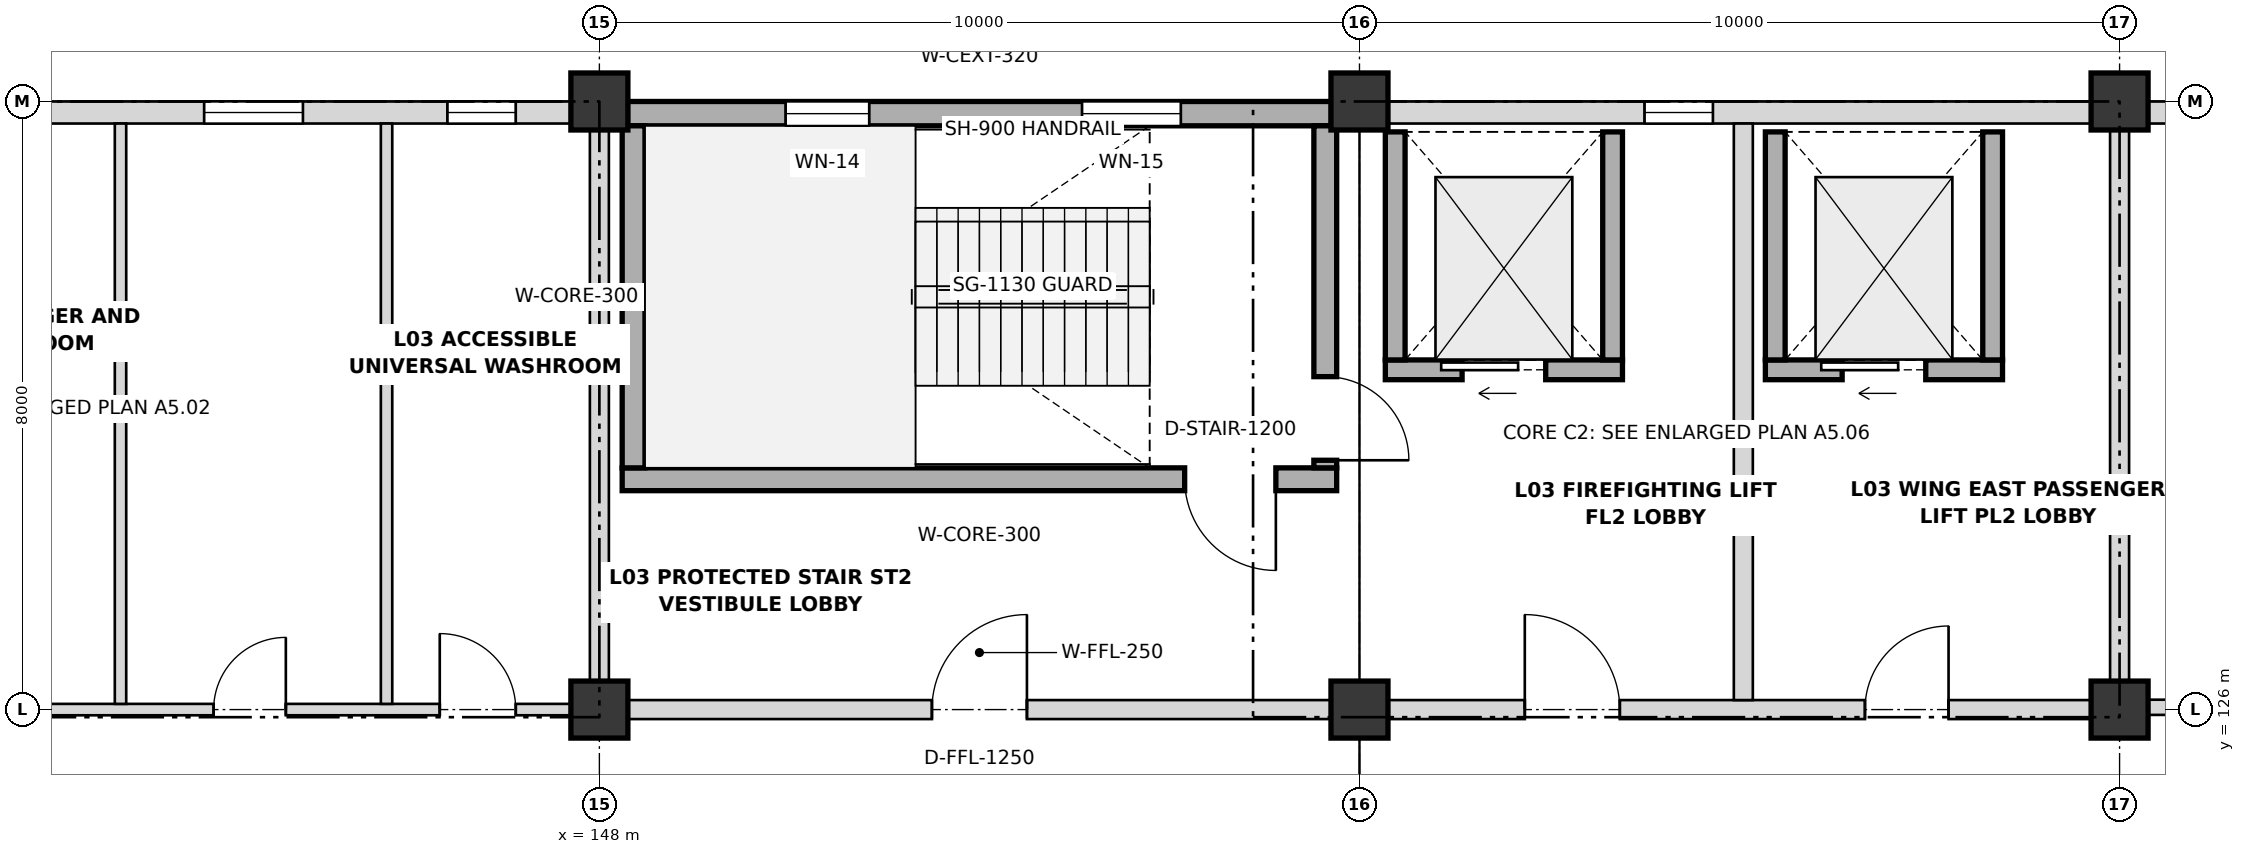
"""IFC4 building model, lengths in metres.
Left out: names, types, materials, properties, quantities, classifications, styles, units other than length and angle.
Written with IfcOpenShell. Run it as: python <this file> out.ifc"""

import sys

from ifc_helpers import new_model, si_unit, direction, frame, frame_2d, origin, origin_2d, place, context, subcontext, project, spatial, rectangle, extrude, element, fill, save


model = new_model("IFC4")
c1 = context("Model", 3, precision=1e-05, world=origin(), true_north=direction((0.0, 1.0)))
c2 = subcontext(c1, "Body", "Model", "MODEL_VIEW")
j1 = project(units=[si_unit("LENGTHUNIT", "METRE"), si_unit("PLANEANGLEUNIT", "RADIAN")], contexts=[c1])
p1 = place(None, origin())
s1 = spatial("IfcSite", under=j1, at=p1, CompositionType="ELEMENT")
p2 = place(p1, origin())
s2 = spatial("IfcBuilding", under=s1, at=p2, CompositionType="ELEMENT")
p3 = place(p2, frame((0.0, 0.0, 14.4)))
s3 = spatial("IfcBuildingStorey", under=s2, at=p3, CompositionType="ELEMENT", Elevation=14.4)
for number, where, z_axis, x_axis in (
    (1, (148.0, 126.0, 0.0), (0.0, 0.0, 1.0), (1.0, 0.0, 0.0)),
    (2, (148.0, 134.0, 0.0), (0.0, 0.0, 1.0), (1.0, 0.0, 0.0)),
    (3, (158.0, 126.0, 0.0), (0.0, 0.0, 1.0), (1.0, 0.0, 0.0)),
    (4, (158.0, 134.0, 0.0), (0.0, 0.0, 1.0), (1.0, 0.0, 0.0)),
    (5, (168.0, 126.0, 0.0), (0.0, 0.0, 1.0), (1.0, 0.0, 0.0)),
    (6, (168.0, 134.0, 0.0), (0.0, 0.0, 1.0), (1.0, 0.0, 0.0)),
):
    element("IfcColumn", number, at=place(p3, frame(where, z_axis=z_axis, x_axis=x_axis)), inside=s3, PredefinedType="COLUMN", context=c2, shape_type="SweptSolid", body=[
        extrude(rectangle(XDim=0.75, YDim=0.75, at=origin_2d()), origin(), (0.0, 0.0, 1.0), 4.2),
    ])
p4 = place(p3, frame((138.37, 133.855, 0.0), z_axis=(0.0, 0.0, 1.0), x_axis=(1.0, 0.0, 0.0)))
e7 = element("IfcWall", 7, at=p4, inside=s3, PredefinedType="SOLIDWALL", context=c2, shape_type="SweptSolid", body=[
    extrude(rectangle(XDim=9.26, YDim=0.29, at=frame_2d((4.63, 0.0))), origin(), (0.0, 0.0, 1.0), 3.178),
])
p5 = place(p4, frame((1.13, 0.0, 1.25)))
e8 = element("IfcOpeningElement", 8, at=p5, cuts=e7, PredefinedType="OPENING", context=c2, shape_type="SweptSolid", body=[
    extrude(rectangle(XDim=1.1, YDim=1.15, at=frame_2d((0.55, 0.575))), frame((0.0, 0.155, 0.0), z_axis=(0.0, -1.0, 0.0), x_axis=(1.0, 0.0, 0.0)), (0.0, 0.0, 1.0), 0.31),
])
p6 = place(p4, frame((4.43, 0.0, 1.25)))
e9 = element("IfcOpeningElement", 9, at=p6, cuts=e7, PredefinedType="OPENING", context=c2, shape_type="SweptSolid", body=[
    extrude(rectangle(XDim=1.3, YDim=1.15, at=frame_2d((0.65, 0.575))), frame((0.0, 0.155, 0.0), z_axis=(0.0, -1.0, 0.0), x_axis=(1.0, 0.0, 0.0)), (0.0, 0.0, 1.0), 0.31),
])
p7 = place(p4, frame((7.63, 0.0, 1.25)))
e10 = element("IfcOpeningElement", 10, at=p7, cuts=e7, PredefinedType="OPENING", context=c2, shape_type="SweptSolid", body=[
    extrude(rectangle(XDim=0.9, YDim=1.4, at=frame_2d((0.45, 0.7))), frame((0.0, 0.155, 0.0), z_axis=(0.0, -1.0, 0.0), x_axis=(1.0, 0.0, 0.0)), (0.0, 0.0, 1.0), 0.31),
])
p8 = place(p3, frame((148.37, 133.84, 0.0), z_axis=(0.0, 0.0, 1.0), x_axis=(1.0, 0.0, 0.0)))
e11 = element("IfcWall", 11, at=p8, inside=s3, PredefinedType="SHEAR", context=c2, shape_type="SweptSolid", body=[
    extrude(rectangle(XDim=9.26, YDim=0.32, at=frame_2d((4.63, 0.0))), origin(), (0.0, 0.0, 1.0), 4.2),
])
p9 = place(p8, frame((2.08, 0.0, 1.05)))
e12 = element("IfcOpeningElement", 12, at=p9, cuts=e11, PredefinedType="OPENING", context=c2, shape_type="SweptSolid", body=[
    extrude(rectangle(XDim=1.1, YDim=1.4, at=frame_2d((0.55, 0.7))), frame((0.0, 0.17, 0.0), z_axis=(0.0, -1.0, 0.0), x_axis=(1.0, 0.0, 0.0)), (0.0, 0.0, 1.0), 0.34),
])
p10 = place(p8, frame((5.98, 0.0, 1.05)))
e13 = element("IfcOpeningElement", 13, at=p10, cuts=e11, PredefinedType="OPENING", context=c2, shape_type="SweptSolid", body=[
    extrude(rectangle(XDim=1.3, YDim=1.4, at=frame_2d((0.65, 0.7))), frame((0.0, 0.17, 0.0), z_axis=(0.0, -1.0, 0.0), x_axis=(1.0, 0.0, 0.0)), (0.0, 0.0, 1.0), 0.34),
])
p11 = place(p3, frame((158.37, 133.855, 0.0), z_axis=(0.0, 0.0, 1.0), x_axis=(1.0, 0.0, 0.0)))
e14 = element("IfcWall", 14, at=p11, inside=s3, PredefinedType="SOLIDWALL", context=c2, shape_type="SweptSolid", body=[
    extrude(rectangle(XDim=9.26, YDim=0.29, at=frame_2d((4.63, 0.0))), origin(), (0.0, 0.0, 1.0), 3.178),
])
p12 = place(p11, frame((3.38, 0.0, 1.05)))
e15 = element("IfcOpeningElement", 15, at=p12, cuts=e14, PredefinedType="OPENING", context=c2, shape_type="SweptSolid", body=[
    extrude(rectangle(XDim=0.9, YDim=1.15, at=frame_2d((0.45, 0.575))), frame((0.0, 0.155, 0.0), z_axis=(0.0, -1.0, 0.0), x_axis=(1.0, 0.0, 0.0)), (0.0, 0.0, 1.0), 0.31),
])
p13 = place(p3, frame((168.37, 133.855, 0.0), z_axis=(0.0, 0.0, 1.0), x_axis=(1.0, 0.0, 0.0)))
e16 = element("IfcWall", 16, at=p13, inside=s3, PredefinedType="SOLIDWALL", context=c2, shape_type="SweptSolid", body=[
    extrude(rectangle(XDim=9.26, YDim=0.29, at=frame_2d((4.63, 0.0))), origin(), (0.0, 0.0, 1.0), 3.178),
])
p14 = place(p13, frame((1.78, 0.0, 1.05)))
e17 = element("IfcOpeningElement", 17, at=p14, cuts=e16, PredefinedType="OPENING", context=c2, shape_type="SweptSolid", body=[
    extrude(rectangle(XDim=1.1, YDim=1.15, at=frame_2d((0.55, 0.575))), frame((0.0, 0.155, 0.0), z_axis=(0.0, -1.0, 0.0), x_axis=(1.0, 0.0, 0.0)), (0.0, 0.0, 1.0), 0.31),
])
p15 = place(p13, frame((6.28, 0.0, 1.05)))
e18 = element("IfcOpeningElement", 18, at=p15, cuts=e16, PredefinedType="OPENING", context=c2, shape_type="SweptSolid", body=[
    extrude(rectangle(XDim=1.3, YDim=1.15, at=frame_2d((0.65, 0.575))), frame((0.0, 0.155, 0.0), z_axis=(0.0, -1.0, 0.0), x_axis=(1.0, 0.0, 0.0)), (0.0, 0.0, 1.0), 0.31),
])
p16 = place(p3, frame((157.7, 129.03, 0.0), z_axis=(0.0, 0.0, 1.0), x_axis=(-1.0, 0.0, 0.0)))
e19 = element("IfcWall", 19, at=p16, inside=s3, PredefinedType="SHEAR", context=c2, shape_type="SweptSolid", body=[
    extrude(rectangle(XDim=9.4, YDim=0.3, at=frame_2d((4.7, 0.0))), origin(), (0.0, 0.0, 1.0), 4.2),
])
p17 = place(p16, frame((0.8, 0.0, 0.0)))
e20 = element("IfcOpeningElement", 20, at=p17, cuts=e19, PredefinedType="OPENING", context=c2, shape_type="SweptSolid", body=[
    extrude(rectangle(XDim=1.2, YDim=2.15, at=frame_2d((0.6, 1.075))), frame((0.0, 0.16, 0.0), z_axis=(0.0, -1.0, 0.0), x_axis=(1.0, 0.0, 0.0)), (0.0, 0.0, 1.0), 0.32),
])
p18 = place(p3, frame((157.55, 133.68, 0.0), z_axis=(0.0, 0.0, 1.0), x_axis=(0.0, -1.0, 0.0)))
e21 = element("IfcWall", 21, at=p18, inside=s3, PredefinedType="SHEAR", context=c2, shape_type="SweptSolid", body=[
    extrude(rectangle(XDim=4.5, YDim=0.3, at=frame_2d((2.25, 0.0))), origin(), (0.0, 0.0, 1.0), 4.2),
])
p19 = place(p18, frame((3.3, 0.0, 0.0)))
e22 = element("IfcOpeningElement", 22, at=p19, cuts=e21, PredefinedType="OPENING", context=c2, shape_type="SweptSolid", body=[
    extrude(rectangle(XDim=1.1, YDim=2.15, at=frame_2d((0.55, 1.075))), frame((0.0, 0.16, 0.0), z_axis=(0.0, -1.0, 0.0), x_axis=(1.0, 0.0, 0.0)), (0.0, 0.0, 1.0), 0.32),
])
p20 = place(p3, frame((148.45, 129.18, 0.0), z_axis=(0.0, 0.0, 1.0), x_axis=(0.0, 1.0, 0.0)))
e23 = element("IfcWall", 23, at=p20, inside=s3, PredefinedType="SHEAR", context=c2, shape_type="SweptSolid", body=[
    extrude(rectangle(XDim=4.5, YDim=0.3, at=frame_2d((2.25, 0.0))), origin(), (0.0, 0.0, 1.0), 4.2),
])
p21 = place(p3, frame((158.34, 130.47, 0.0), z_axis=(0.0, 0.0, 1.0), x_axis=(1.0, 0.0, 0.0)))
e24 = element("IfcWall", 24, at=p21, inside=s3, PredefinedType="SHEAR", context=c2, shape_type="SweptSolid", body=[
    extrude(rectangle(XDim=3.12, YDim=0.26, at=frame_2d((1.56, 0.0))), origin(), (0.0, 0.0, 1.0), 4.2),
])
p22 = place(p21, frame((1.01, 0.0, 0.0)))
e25 = element("IfcOpeningElement", 25, at=p22, cuts=e24, PredefinedType="OPENING", context=c2, shape_type="SweptSolid", body=[
    extrude(rectangle(XDim=1.1, YDim=2.1, at=frame_2d((0.55, 1.05))), frame((0.0, 0.14, 0.0), z_axis=(0.0, -1.0, 0.0), x_axis=(1.0, 0.0, 0.0)), (0.0, 0.0, 1.0), 0.28),
])
for number, where, z_axis, x_axis in (
    (26, (158.47, 130.6, 0.0), (0.0, 0.0, 1.0), (0.0, 1.0, 0.0)),
    (27, (161.33, 130.6, 0.0), (0.0, 0.0, 1.0), (0.0, 1.0, 0.0)),
):
    element("IfcWall", number, at=place(p3, frame(where, z_axis=z_axis, x_axis=x_axis)), inside=s3, PredefinedType="SHEAR", context=c2, shape_type="SweptSolid", body=[
        extrude(rectangle(XDim=3.0, YDim=0.26, at=frame_2d((1.5, 0.0))), origin(), (0.0, 0.0, 1.0), 4.2),
    ])
p23 = place(p3, frame((163.34, 130.47, 0.0), z_axis=(0.0, 0.0, 1.0), x_axis=(1.0, 0.0, 0.0)))
e28 = element("IfcWall", 28, at=p23, inside=s3, PredefinedType="SHEAR", context=c2, shape_type="SweptSolid", body=[
    extrude(rectangle(XDim=3.12, YDim=0.26, at=frame_2d((1.56, 0.0))), origin(), (0.0, 0.0, 1.0), 4.2),
])
p24 = place(p23, frame((1.01, 0.0, 0.0)))
e29 = element("IfcOpeningElement", 29, at=p24, cuts=e28, PredefinedType="OPENING", context=c2, shape_type="SweptSolid", body=[
    extrude(rectangle(XDim=1.1, YDim=2.15, at=frame_2d((0.55, 1.075))), frame((0.0, 0.14, 0.0), z_axis=(0.0, -1.0, 0.0), x_axis=(1.0, 0.0, 0.0)), (0.0, 0.0, 1.0), 0.28),
])
for number, where, z_axis, x_axis in (
    (30, (163.47, 130.6, 0.0), (0.0, 0.0, 1.0), (0.0, 1.0, 0.0)),
    (31, (166.33, 130.6, 0.0), (0.0, 0.0, 1.0), (0.0, 1.0, 0.0)),
):
    element("IfcWall", number, at=place(p3, frame(where, z_axis=z_axis, x_axis=x_axis)), inside=s3, PredefinedType="SHEAR", context=c2, shape_type="SweptSolid", body=[
        extrude(rectangle(XDim=3.0, YDim=0.26, at=frame_2d((1.5, 0.0))), origin(), (0.0, 0.0, 1.0), 4.2),
    ])
p25 = place(p3, frame((138.38, 126.0, 0.0), z_axis=(0.0, 0.0, 1.0), x_axis=(1.0, 0.0, 0.0)))
e32 = element("IfcWall", 32, at=p25, inside=s3, PredefinedType="PARTITIONING", context=c2, shape_type="SweptSolid", body=[
    extrude(rectangle(XDim=9.24, YDim=0.15, at=frame_2d((4.62, 0.0))), origin(), (0.0, 0.0, 1.0), 3.078),
])
p26 = place(p25, frame((1.17, 0.0, 0.0)))
e33 = element("IfcOpeningElement", 33, at=p26, cuts=e32, PredefinedType="OPENING", context=c2, shape_type="SweptSolid", body=[
    extrude(rectangle(XDim=0.9, YDim=2.05, at=frame_2d((0.45, 1.025))), frame((0.0, 0.085, 0.0), z_axis=(0.0, -1.0, 0.0), x_axis=(1.0, 0.0, 0.0)), (0.0, 0.0, 1.0), 0.17),
])
p27 = place(p25, frame((4.545, 0.0, 0.0)))
e34 = element("IfcOpeningElement", 34, at=p27, cuts=e32, PredefinedType="OPENING", context=c2, shape_type="SweptSolid", body=[
    extrude(rectangle(XDim=0.95, YDim=2.05, at=frame_2d((0.475, 1.025))), frame((0.0, 0.085, 0.0), z_axis=(0.0, -1.0, 0.0), x_axis=(1.0, 0.0, 0.0)), (0.0, 0.0, 1.0), 0.17),
])
p28 = place(p25, frame((7.52, 0.0, 0.0)))
e35 = element("IfcOpeningElement", 35, at=p28, cuts=e32, PredefinedType="OPENING", context=c2, shape_type="SweptSolid", body=[
    extrude(rectangle(XDim=1.0, YDim=2.05, at=frame_2d((0.5, 1.025))), frame((0.0, 0.085, 0.0), z_axis=(0.0, -1.0, 0.0), x_axis=(1.0, 0.0, 0.0)), (0.0, 0.0, 1.0), 0.17),
])
p29 = place(p3, frame((148.38, 126.0, 0.0), z_axis=(0.0, 0.0, 1.0), x_axis=(1.0, 0.0, 0.0)))
e36 = element("IfcWall", 36, at=p29, inside=s3, PredefinedType="PARTITIONING", context=c2, shape_type="SweptSolid", body=[
    extrude(rectangle(XDim=9.24, YDim=0.25, at=frame_2d((4.62, 0.0))), origin(), (0.0, 0.0, 1.0), 3.078),
])
p30 = place(p29, frame((3.995, 0.0, 0.0)))
e37 = element("IfcOpeningElement", 37, at=p30, cuts=e36, PredefinedType="OPENING", context=c2, shape_type="SweptSolid", body=[
    extrude(rectangle(XDim=1.25, YDim=2.15, at=frame_2d((0.625, 1.075))), frame((0.0, 0.135, 0.0), z_axis=(0.0, -1.0, 0.0), x_axis=(1.0, 0.0, 0.0)), (0.0, 0.0, 1.0), 0.27),
])
p31 = place(p3, frame((158.38, 126.0, 0.0), z_axis=(0.0, 0.0, 1.0), x_axis=(1.0, 0.0, 0.0)))
e38 = element("IfcWall", 38, at=p31, inside=s3, PredefinedType="PARTITIONING", context=c2, shape_type="SweptSolid", body=[
    extrude(rectangle(XDim=9.24, YDim=0.25, at=frame_2d((4.62, 0.0))), origin(), (0.0, 0.0, 1.0), 3.078),
])
p32 = place(p31, frame((1.795, 0.0, 0.0)))
e39 = element("IfcOpeningElement", 39, at=p32, cuts=e38, PredefinedType="OPENING", context=c2, shape_type="SweptSolid", body=[
    extrude(rectangle(XDim=1.25, YDim=2.15, at=frame_2d((0.625, 1.075))), frame((0.0, 0.135, 0.0), z_axis=(0.0, -1.0, 0.0), x_axis=(1.0, 0.0, 0.0)), (0.0, 0.0, 1.0), 0.27),
])
p33 = place(p31, frame((6.27, 0.0, 0.0)))
e40 = element("IfcOpeningElement", 40, at=p33, cuts=e38, PredefinedType="OPENING", context=c2, shape_type="SweptSolid", body=[
    extrude(rectangle(XDim=1.1, YDim=2.15, at=frame_2d((0.55, 1.075))), frame((0.0, 0.135, 0.0), z_axis=(0.0, -1.0, 0.0), x_axis=(1.0, 0.0, 0.0)), (0.0, 0.0, 1.0), 0.27),
])
p34 = place(p3, frame((163.05, 126.125, 0.0), z_axis=(0.0, 0.0, 1.0), x_axis=(0.0, 1.0, 0.0)))
e41 = element("IfcWall", 41, at=p34, inside=s3, PredefinedType="PARTITIONING", context=c2, shape_type="SweptSolid", body=[
    extrude(rectangle(XDim=7.585, YDim=0.25, at=frame_2d((3.792, 0.0))), origin(), (0.0, 0.0, 1.0), 3.078),
])
for number, where, z_axis, x_axis in (
    (42, (141.7, 126.075, 0.0), (0.0, 0.0, 1.0), (0.0, 1.0, 0.0)),
    (43, (145.2, 126.075, 0.0), (0.0, 0.0, 1.0), (0.0, 1.0, 0.0)),
):
    element("IfcWall", number, at=place(p3, frame(where, z_axis=z_axis, x_axis=x_axis)), inside=s3, PredefinedType="PARTITIONING", context=c2, shape_type="SweptSolid", body=[
        extrude(rectangle(XDim=7.635, YDim=0.15, at=frame_2d((3.817, 0.0))), origin(), (0.0, 0.0, 1.0), 3.078),
    ])
for number, where, z_axis, x_axis in (
    (44, (148.0, 126.38, 0.0), (0.0, 0.0, 1.0), (0.0, 1.0, 0.0)),
    (45, (168.0, 126.38, 0.0), (0.0, 0.0, 1.0), (0.0, 1.0, 0.0)),
):
    element("IfcWall", number, at=place(p3, frame(where, z_axis=z_axis, x_axis=x_axis)), inside=s3, PredefinedType="PARTITIONING", context=c2, shape_type="SweptSolid", body=[
        extrude(rectangle(XDim=7.24, YDim=0.25, at=frame_2d((3.62, 0.0))), origin(), (0.0, 0.0, 1.0), 3.178),
    ])
p35 = place(p3, frame((168.3, 126.03, 0.0), z_axis=(0.0, 0.0, 1.0), x_axis=(1.0, 0.0, 0.0)))
e46 = element("IfcWall", 46, at=p35, inside=s3, PredefinedType="PARTITIONING", context=c2, shape_type="SweptSolid", body=[
    extrude(rectangle(XDim=9.4, YDim=0.2, at=frame_2d((4.7, 0.0))), origin(), (0.0, 0.0, 1.0), 3.078),
])
p36 = place(p35, frame((4.175, 0.0, 0.0)))
e47 = element("IfcOpeningElement", 47, at=p36, cuts=e46, PredefinedType="OPENING", context=c2, shape_type="SweptSolid", body=[
    extrude(rectangle(XDim=1.05, YDim=2.2, at=frame_2d((0.525, 1.1))), frame((0.0, 0.11, 0.0), z_axis=(0.0, -1.0, 0.0), x_axis=(1.0, 0.0, 0.0)), (0.0, 0.0, 1.0), 0.22),
])
p37 = place(p6, origin())
e48 = element("IfcWindow", 48, at=p37, inside=s3, PartitioningType="SINGLE_PANEL", PredefinedType="WINDOW", context=c2, shape_type="SweptSolid", body=[
    extrude(rectangle(XDim=1.3, YDim=1.15, at=frame_2d((0.65, 0.575))), frame((0.0, 0.03, 0.0), z_axis=(0.0, -1.0, 0.0), x_axis=(1.0, 0.0, 0.0)), (0.0, 0.0, 1.0), 0.06),
])
fill(e9, e48)
p38 = place(p7, origin())
e49 = element("IfcWindow", 49, at=p38, inside=s3, PartitioningType="SINGLE_PANEL", PredefinedType="WINDOW", context=c2, shape_type="SweptSolid", body=[
    extrude(rectangle(XDim=0.9, YDim=1.4, at=frame_2d((0.45, 0.7))), frame((0.0, 0.03, 0.0), z_axis=(0.0, -1.0, 0.0), x_axis=(1.0, 0.0, 0.0)), (0.0, 0.0, 1.0), 0.06),
])
fill(e10, e49)
p39 = place(p9, origin())
e50 = element("IfcWindow", 50, at=p39, inside=s3, PartitioningType="SINGLE_PANEL", PredefinedType="WINDOW", context=c2, shape_type="SweptSolid", body=[
    extrude(rectangle(XDim=1.1, YDim=1.4, at=frame_2d((0.55, 0.7))), frame((0.0, 0.03, 0.0), z_axis=(0.0, -1.0, 0.0), x_axis=(1.0, 0.0, 0.0)), (0.0, 0.0, 1.0), 0.06),
])
fill(e12, e50)
p40 = place(p10, origin())
e51 = element("IfcWindow", 51, at=p40, inside=s3, PartitioningType="SINGLE_PANEL", PredefinedType="WINDOW", context=c2, shape_type="SweptSolid", body=[
    extrude(rectangle(XDim=1.3, YDim=1.4, at=frame_2d((0.65, 0.7))), frame((0.0, 0.03, 0.0), z_axis=(0.0, -1.0, 0.0), x_axis=(1.0, 0.0, 0.0)), (0.0, 0.0, 1.0), 0.06),
])
fill(e13, e51)
p41 = place(p12, origin())
e52 = element("IfcWindow", 52, at=p41, inside=s3, PartitioningType="SINGLE_PANEL", PredefinedType="WINDOW", context=c2, shape_type="SweptSolid", body=[
    extrude(rectangle(XDim=0.9, YDim=1.15, at=frame_2d((0.45, 0.575))), frame((0.0, 0.03, 0.0), z_axis=(0.0, -1.0, 0.0), x_axis=(1.0, 0.0, 0.0)), (0.0, 0.0, 1.0), 0.06),
])
fill(e15, e52)
p42 = place(p17, origin())
e53 = element("IfcDoor", 53, at=p42, inside=s3, OperationType="SINGLE_SWING_LEFT", PredefinedType="DOOR", context=c2, shape_type="SweptSolid", body=[
    extrude(rectangle(XDim=1.2, YDim=2.15, at=frame_2d((0.6, 1.075))), frame((0.0, 0.025, 0.0), z_axis=(0.0, -1.0, 0.0), x_axis=(1.0, 0.0, 0.0)), (0.0, 0.0, 1.0), 0.05),
])
fill(e20, e53)
p43 = place(p19, origin())
e54 = element("IfcDoor", 54, at=p43, inside=s3, OperationType="SINGLE_SWING_RIGHT", PredefinedType="DOOR", context=c2, shape_type="SweptSolid", body=[
    extrude(rectangle(XDim=1.1, YDim=2.15, at=frame_2d((0.55, 1.075))), frame((0.0, 0.025, 0.0), z_axis=(0.0, -1.0, 0.0), x_axis=(1.0, 0.0, 0.0)), (0.0, 0.0, 1.0), 0.05),
])
fill(e22, e54)
p44 = place(p22, origin())
e55 = element("IfcDoor", 55, at=p44, inside=s3, OperationType="SLIDING_TO_LEFT", PredefinedType="DOOR", context=c2, shape_type="SweptSolid", body=[
    extrude(rectangle(XDim=1.1, YDim=2.1, at=frame_2d((0.55, 1.05))), frame((0.0, 0.025, 0.0), z_axis=(0.0, -1.0, 0.0), x_axis=(1.0, 0.0, 0.0)), (0.0, 0.0, 1.0), 0.05),
])
fill(e25, e55)
p45 = place(p24, origin())
e56 = element("IfcDoor", 56, at=p45, inside=s3, OperationType="SLIDING_TO_LEFT", PredefinedType="DOOR", context=c2, shape_type="SweptSolid", body=[
    extrude(rectangle(XDim=1.1, YDim=2.15, at=frame_2d((0.55, 1.075))), frame((0.0, 0.025, 0.0), z_axis=(0.0, -1.0, 0.0), x_axis=(1.0, 0.0, 0.0)), (0.0, 0.0, 1.0), 0.05),
])
fill(e29, e56)
p46 = place(p27, origin())
e57 = element("IfcDoor", 57, at=p46, inside=s3, OperationType="SINGLE_SWING_RIGHT", PredefinedType="DOOR", context=c2, shape_type="SweptSolid", body=[
    extrude(rectangle(XDim=0.95, YDim=2.05, at=frame_2d((0.475, 1.025))), frame((0.0, 0.025, 0.0), z_axis=(0.0, -1.0, 0.0), x_axis=(1.0, 0.0, 0.0)), (0.0, 0.0, 1.0), 0.05),
])
fill(e34, e57)
p47 = place(p28, origin())
e58 = element("IfcDoor", 58, at=p47, inside=s3, OperationType="SINGLE_SWING_LEFT", PredefinedType="DOOR", context=c2, shape_type="SweptSolid", body=[
    extrude(rectangle(XDim=1.0, YDim=2.05, at=frame_2d((0.5, 1.025))), frame((0.0, 0.025, 0.0), z_axis=(0.0, -1.0, 0.0), x_axis=(1.0, 0.0, 0.0)), (0.0, 0.0, 1.0), 0.05),
])
fill(e35, e58)
p48 = place(p30, origin())
e59 = element("IfcDoor", 59, at=p48, inside=s3, OperationType="SINGLE_SWING_RIGHT", PredefinedType="DOOR", context=c2, shape_type="SweptSolid", body=[
    extrude(rectangle(XDim=1.25, YDim=2.15, at=frame_2d((0.625, 1.075))), frame((0.0, 0.025, 0.0), z_axis=(0.0, -1.0, 0.0), x_axis=(1.0, 0.0, 0.0)), (0.0, 0.0, 1.0), 0.05),
])
fill(e37, e59)
p49 = place(p32, origin())
e60 = element("IfcDoor", 60, at=p49, inside=s3, OperationType="SINGLE_SWING_LEFT", PredefinedType="DOOR", context=c2, shape_type="SweptSolid", body=[
    extrude(rectangle(XDim=1.25, YDim=2.15, at=frame_2d((0.625, 1.075))), frame((0.0, 0.025, 0.0), z_axis=(0.0, -1.0, 0.0), x_axis=(1.0, 0.0, 0.0)), (0.0, 0.0, 1.0), 0.05),
])
fill(e39, e60)
p50 = place(p33, origin())
e61 = element("IfcDoor", 61, at=p50, inside=s3, OperationType="SINGLE_SWING_RIGHT", PredefinedType="DOOR", context=c2, shape_type="SweptSolid", body=[
    extrude(rectangle(XDim=1.1, YDim=2.15, at=frame_2d((0.55, 1.075))), frame((0.0, 0.025, 0.0), z_axis=(0.0, -1.0, 0.0), x_axis=(1.0, 0.0, 0.0)), (0.0, 0.0, 1.0), 0.05),
])
fill(e40, e61)
save(model, sys.argv[1])
